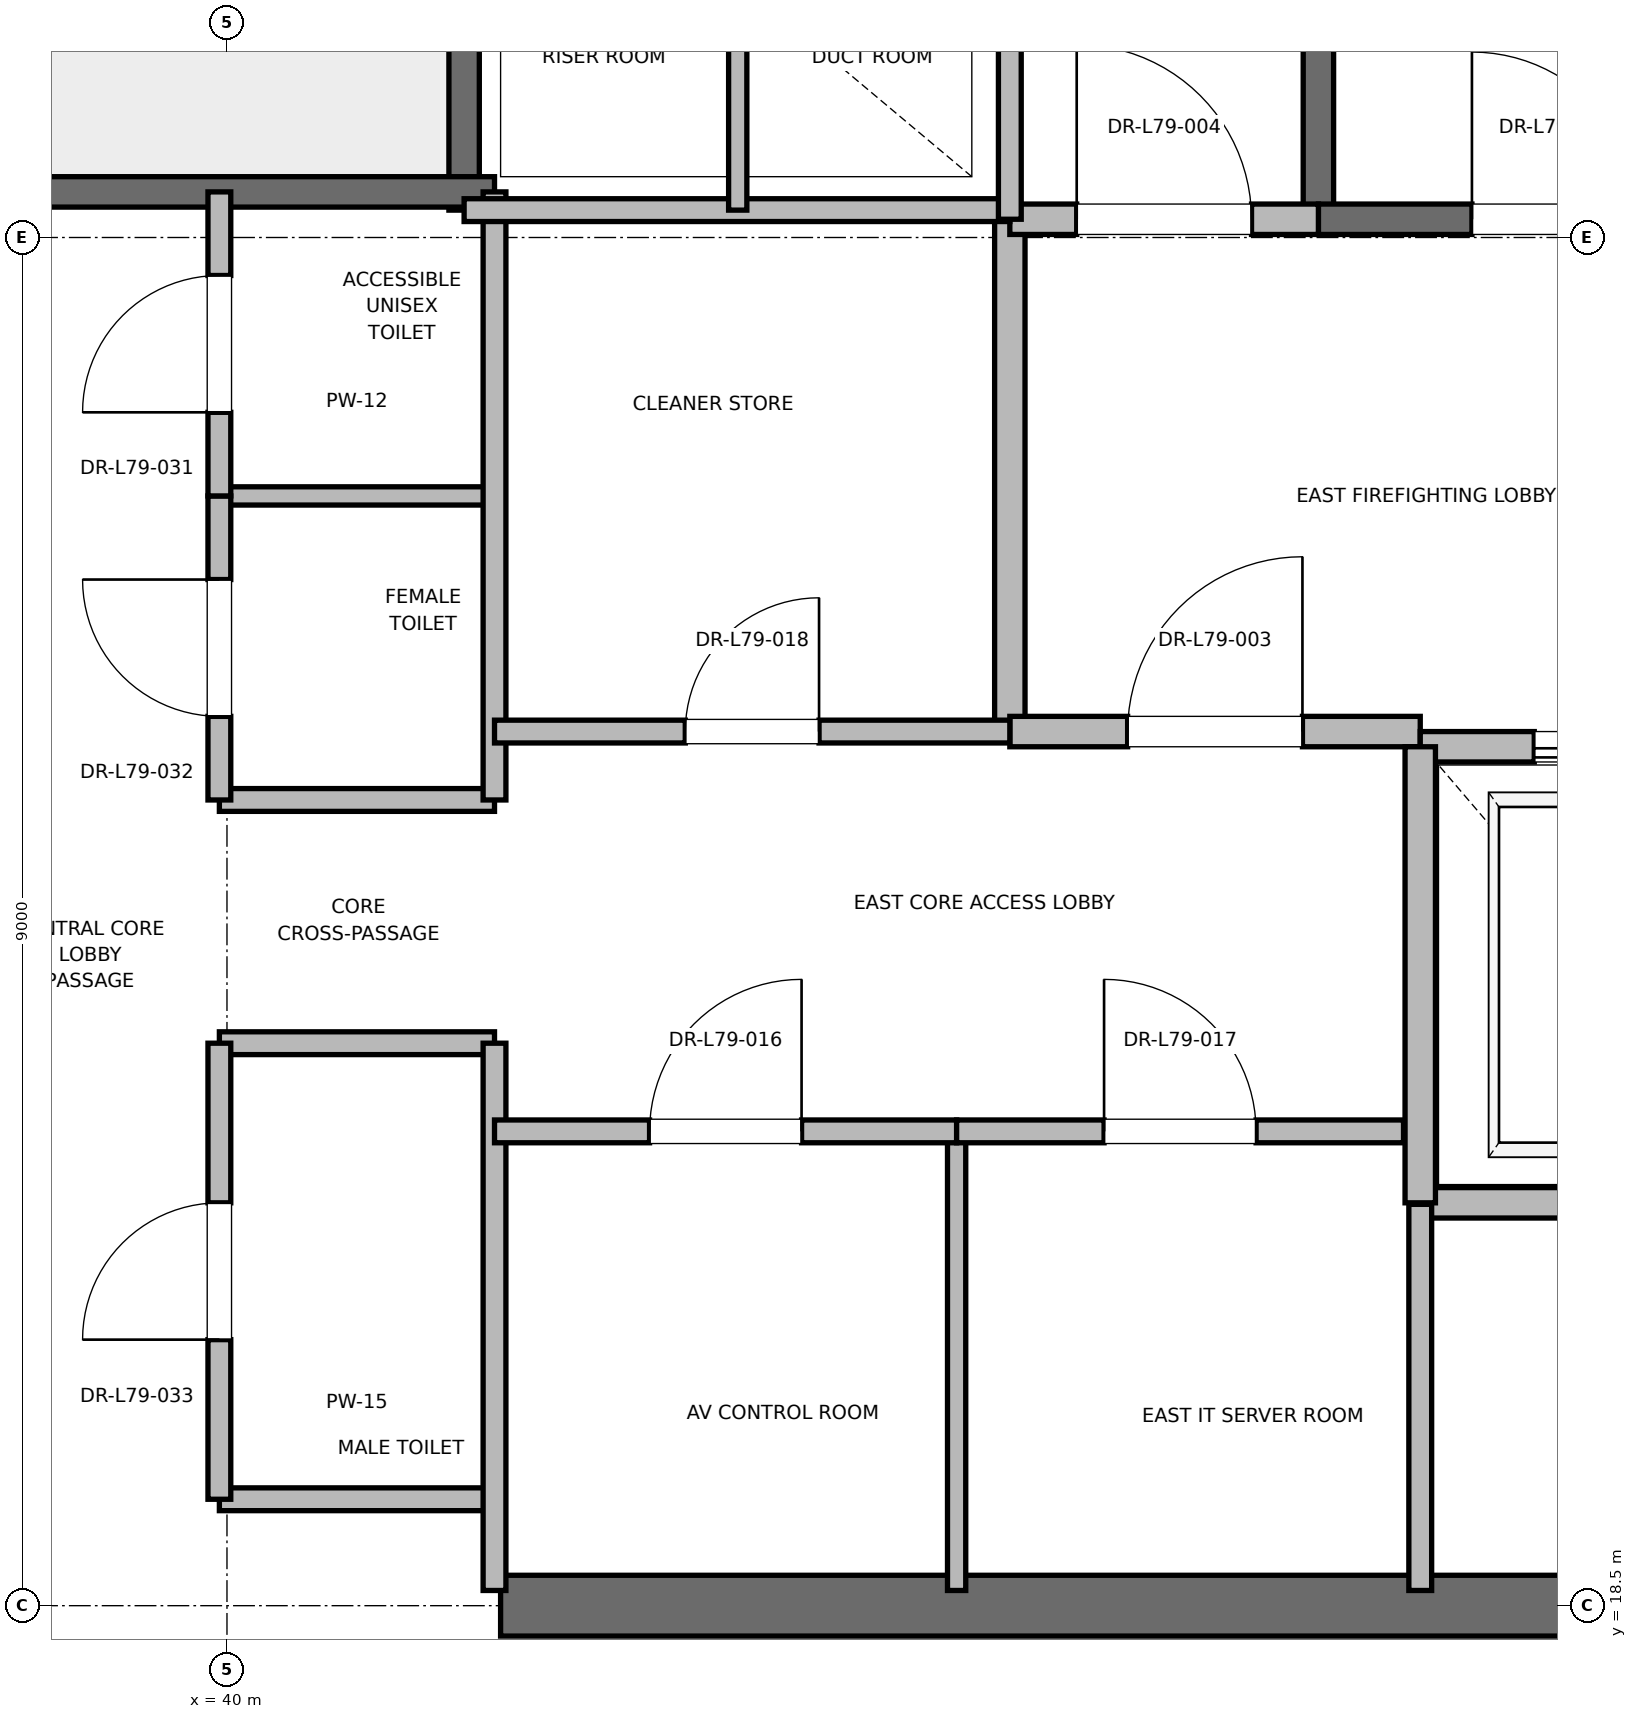
"""IFC4 building model, lengths in metres.
Left out: names, types, materials, properties, quantities, classifications, styles, units other than length and angle.
Written with IfcOpenShell. Run it as: python <this file> out.ifc"""

import sys

from ifc_helpers import new_model, si_unit, direction, frame, frame_2d, origin, place, context, subcontext, project, spatial, rectangle, extrude, element, fill, save


model = new_model("IFC4")
c1 = context("Model", 3, precision=1e-05, world=origin(), true_north=direction((0.0, 1.0)))
c2 = subcontext(c1, "Body", "Model", "MODEL_VIEW")
j1 = project(units=[si_unit("LENGTHUNIT", "METRE"), si_unit("PLANEANGLEUNIT", "RADIAN")], contexts=[c1])
p1 = place(None, origin())
s1 = spatial("IfcSite", under=j1, at=p1, CompositionType="ELEMENT")
p2 = place(p1, origin())
s2 = spatial("IfcBuilding", under=s1, at=p2, CompositionType="ELEMENT")
p3 = place(p2, frame((0.0, 0.0, 338.8)))
s3 = spatial("IfcBuildingStorey", under=s2, at=p3, CompositionType="ELEMENT", Elevation=338.8)
p4 = place(p3, frame((41.8, 18.5, 0.0), z_axis=(0.0, 0.0, 1.0), x_axis=(1.0, 0.0, 0.0)))
e1 = element("IfcWall", 1, at=p4, inside=s3, PredefinedType="SHEAR", context=c2, shape_type="SweptSolid", body=[
    extrude(rectangle(XDim=9.2, YDim=0.4, at=frame_2d((4.6, 0.0))), origin(), (0.0, 0.0, 1.0), 3.7),
])
p5 = place(p3, frame((47.18, 27.62, 0.0), z_axis=(0.0, 0.0, 1.0), x_axis=(0.0, 1.0, 0.0)))
e2 = element("IfcWall", 2, at=p5, inside=s3, PredefinedType="SOLIDWALL", context=c2, shape_type="SweptSolid", body=[
    extrude(rectangle(XDim=8.18, YDim=0.2, at=frame_2d((4.09, 0.0))), origin(), (0.0, 0.0, 1.0), 3.7),
])
p6 = place(p3, frame((47.18, 27.62, 0.0), z_axis=(0.0, 0.0, 1.0), x_axis=(1.0, 0.0, 0.0)))
e3 = element("IfcWall", 3, at=p6, inside=s3, PredefinedType="SOLIDWALL", context=c2, shape_type="SweptSolid", body=[
    extrude(rectangle(XDim=3.12, YDim=0.2, at=frame_2d((1.56, 0.0))), origin(), (0.0, 0.0, 1.0), 3.7),
])
p7 = place(p6, frame((1.01, 0.0, 0.0)))
e4 = element("IfcOpeningElement", 4, at=p7, cuts=e3, PredefinedType="OPENING", context=c2, shape_type="SweptSolid", body=[
    extrude(rectangle(XDim=1.1, YDim=2.15, at=frame_2d((0.55, 1.075))), frame((0.0, 0.1, 0.0), z_axis=(0.0, -1.0, 0.0), x_axis=(1.0, 0.0, 0.0)), (0.0, 0.0, 1.0), 0.2),
])
p8 = place(p3, frame((41.56, 27.68, 0.0), z_axis=(0.0, 0.0, 1.0), x_axis=(0.0, 1.0, 0.0)))
e5 = element("IfcWall", 5, at=p8, inside=s3, PredefinedType="SOLIDWALL", context=c2, shape_type="SweptSolid", body=[
    extrude(rectangle(XDim=8.57, YDim=0.2, at=frame_2d((4.285, 0.0))), origin(), (0.0, 0.0, 1.0), 3.7),
])
p9 = place(p3, frame((38.44, 27.8, 0.0), z_axis=(0.0, 0.0, 1.0), x_axis=(1.0, 0.0, 0.0)))
e6 = element("IfcWall", 6, at=p9, inside=s3, PredefinedType="SOLIDWALL", context=c2, shape_type="SweptSolid", body=[
    extrude(rectangle(XDim=3.32, YDim=0.2, at=frame_2d((1.66, 0.0))), origin(), (0.0, 0.0, 1.0), 3.7),
])
p10 = place(p3, frame((45.15, 24.25, 0.0), z_axis=(0.0, 0.0, 1.0), x_axis=(0.0, 1.0, 0.0)))
e7 = element("IfcWall", 7, at=p10, inside=s3, PredefinedType="PARTITIONING", context=c2, shape_type="SweptSolid", body=[
    extrude(rectangle(XDim=3.37, YDim=0.2, at=frame_2d((1.685, 0.0))), origin(), (0.0, 0.0, 1.0), 3.7),
])
p11 = place(p3, frame((45.15, 24.25, 0.0), z_axis=(0.0, 0.0, 1.0), x_axis=(1.0, 0.0, 0.0)))
e8 = element("IfcWall", 8, at=p11, inside=s3, PredefinedType="PARTITIONING", context=c2, shape_type="SweptSolid", body=[
    extrude(rectangle(XDim=2.7, YDim=0.2, at=frame_2d((1.35, 0.0))), origin(), (0.0, 0.0, 1.0), 3.7),
])
p12 = place(p11, frame((0.775, 0.0, 0.0)))
e9 = element("IfcOpeningElement", 9, at=p12, cuts=e8, PredefinedType="OPENING", context=c2, shape_type="SweptSolid", body=[
    extrude(rectangle(XDim=1.15, YDim=2.2, at=frame_2d((0.575, 1.1))), frame((0.0, 0.1, 0.0), z_axis=(0.0, -1.0, 0.0), x_axis=(1.0, 0.0, 0.0)), (0.0, 0.0, 1.0), 0.2),
])
p13 = place(p3, frame((45.15, 27.62, 0.0), z_axis=(0.0, 0.0, 1.0), x_axis=(1.0, 0.0, 0.0)))
e10 = element("IfcWall", 10, at=p13, inside=s3, PredefinedType="PARTITIONING", context=c2, shape_type="SweptSolid", body=[
    extrude(rectangle(XDim=2.03, YDim=0.2, at=frame_2d((1.015, 0.0))), origin(), (0.0, 0.0, 1.0), 3.7),
])
p14 = place(p13, frame((0.44, 0.0, 0.0)))
e11 = element("IfcOpeningElement", 11, at=p14, cuts=e10, PredefinedType="OPENING", context=c2, shape_type="SweptSolid", body=[
    extrude(rectangle(XDim=1.15, YDim=2.2, at=frame_2d((0.575, 1.1))), frame((0.0, 0.1, 0.0), z_axis=(0.0, -1.0, 0.0), x_axis=(1.0, 0.0, 0.0)), (0.0, 0.0, 1.0), 0.2),
])
p15 = place(p3, frame((47.85, 21.15, 0.0), z_axis=(0.0, 0.0, 1.0), x_axis=(1.0, 0.0, 0.0)))
e12 = element("IfcWall", 12, at=p15, inside=s3, PredefinedType="SOLIDWALL", context=c2, shape_type="SweptSolid", body=[
    extrude(rectangle(XDim=2.6, YDim=0.2, at=frame_2d((1.3, 0.0))), origin(), (0.0, 0.0, 1.0), 3.7),
])
p16 = place(p3, frame((50.45, 24.15, 0.0), z_axis=(0.0, 0.0, 1.0), x_axis=(-1.0, 0.0, 0.0)))
e13 = element("IfcWall", 13, at=p16, inside=s3, PredefinedType="SOLIDWALL", context=c2, shape_type="SweptSolid", body=[
    extrude(rectangle(XDim=2.6, YDim=0.2, at=frame_2d((1.3, 0.0))), origin(), (0.0, 0.0, 1.0), 2.78),
])
p17 = place(p16, frame((0.75, 0.0, 0.0)))
e14 = element("IfcOpeningElement", 14, at=p17, cuts=e13, PredefinedType="OPENING", context=c2, shape_type="SweptSolid", body=[
    extrude(rectangle(XDim=1.1, YDim=2.2, at=frame_2d((0.55, 1.1))), frame((0.0, 0.1, 0.0), z_axis=(0.0, -1.0, 0.0), x_axis=(1.0, 0.0, 0.0)), (0.0, 0.0, 1.0), 0.2),
])
p18 = place(p3, frame((47.85, 24.15, 0.0), z_axis=(0.0, 0.0, 1.0), x_axis=(0.0, -1.0, 0.0)))
e15 = element("IfcWall", 15, at=p18, inside=s3, PredefinedType="SOLIDWALL", context=c2, shape_type="SweptSolid", body=[
    extrude(rectangle(XDim=3.0, YDim=0.2, at=frame_2d((1.5, 0.0))), origin(), (0.0, 0.0, 1.0), 3.7),
])
for number, where, z_axis, x_axis in (
    (16, (39.95, 19.2, 0.0), (0.0, 0.0, 1.0), (1.0, 0.0, 0.0)),
    (17, (39.95, 22.2, 0.0), (0.0, 0.0, 1.0), (1.0, 0.0, 0.0)),
    (18, (39.95, 23.8, 0.0), (0.0, 0.0, 1.0), (1.0, 0.0, 0.0)),
):
    element("IfcWall", number, at=place(p3, frame(where, z_axis=z_axis, x_axis=x_axis)), inside=s3, PredefinedType="PARTITIONING", context=c2, shape_type="SweptSolid", body=[
        extrude(rectangle(XDim=1.81, YDim=0.15, at=frame_2d((0.905, 0.0))), origin(), (0.0, 0.0, 1.0), 2.85),
    ])
p19 = place(p3, frame((39.95, 25.8, 0.0), z_axis=(0.0, 0.0, 1.0), x_axis=(1.0, 0.0, 0.0)))
e19 = element("IfcWall", 19, at=p19, inside=s3, PredefinedType="PARTITIONING", context=c2, shape_type="SweptSolid", body=[
    extrude(rectangle(XDim=1.81, YDim=0.12, at=frame_2d((0.905, 0.0))), origin(), (0.0, 0.0, 1.0), 2.85),
])
p20 = place(p3, frame((41.76, 18.6, 0.0), z_axis=(0.0, 0.0, 1.0), x_axis=(0.0, 1.0, 0.0)))
e20 = element("IfcWall", 20, at=p20, inside=s3, PredefinedType="PARTITIONING", context=c2, shape_type="SweptSolid", body=[
    extrude(rectangle(XDim=3.6, YDim=0.15, at=frame_2d((1.8, 0.0))), origin(), (0.0, 0.0, 1.0), 2.78),
])
p21 = place(p3, frame((41.76, 23.8, 0.0), z_axis=(0.0, 0.0, 1.0), x_axis=(0.0, 1.0, 0.0)))
e21 = element("IfcWall", 21, at=p21, inside=s3, PredefinedType="PARTITIONING", context=c2, shape_type="SweptSolid", body=[
    extrude(rectangle(XDim=4.0, YDim=0.15, at=frame_2d((2.0, 0.0))), origin(), (0.0, 0.0, 1.0), 2.85),
])
p22 = place(p3, frame((39.95, 19.2, 0.0), z_axis=(0.0, 0.0, 1.0), x_axis=(0.0, 1.0, 0.0)))
e22 = element("IfcWall", 22, at=p22, inside=s3, PredefinedType="PARTITIONING", context=c2, shape_type="SweptSolid", body=[
    extrude(rectangle(XDim=3.0, YDim=0.15, at=frame_2d((1.5, 0.0))), origin(), (0.0, 0.0, 1.0), 2.85),
])
p23 = place(p22, frame((1.05, 0.0, 0.0)))
e23 = element("IfcOpeningElement", 23, at=p23, cuts=e22, PredefinedType="OPENING", context=c2, shape_type="SweptSolid", body=[
    extrude(rectangle(XDim=0.9, YDim=2.1, at=frame_2d((0.45, 1.05))), frame((0.0, 0.075, 0.0), z_axis=(0.0, -1.0, 0.0), x_axis=(1.0, 0.0, 0.0)), (0.0, 0.0, 1.0), 0.15),
])
p24 = place(p3, frame((39.95, 23.8, 0.0), z_axis=(0.0, 0.0, 1.0), x_axis=(0.0, 1.0, 0.0)))
e24 = element("IfcWall", 24, at=p24, inside=s3, PredefinedType="PARTITIONING", context=c2, shape_type="SweptSolid", body=[
    extrude(rectangle(XDim=2.0, YDim=0.15, at=frame_2d((1.0, 0.0))), origin(), (0.0, 0.0, 1.0), 2.85),
])
p25 = place(p24, frame((0.55, 0.0, 0.0)))
e25 = element("IfcOpeningElement", 25, at=p25, cuts=e24, PredefinedType="OPENING", context=c2, shape_type="SweptSolid", body=[
    extrude(rectangle(XDim=0.9, YDim=2.1, at=frame_2d((0.45, 1.05))), frame((0.0, 0.075, 0.0), z_axis=(0.0, -1.0, 0.0), x_axis=(1.0, 0.0, 0.0)), (0.0, 0.0, 1.0), 0.15),
])
p26 = place(p3, frame((39.95, 25.8, 0.0), z_axis=(0.0, 0.0, 1.0), x_axis=(0.0, 1.0, 0.0)))
e26 = element("IfcWall", 26, at=p26, inside=s3, PredefinedType="PARTITIONING", context=c2, shape_type="SweptSolid", body=[
    extrude(rectangle(XDim=2.0, YDim=0.15, at=frame_2d((1.0, 0.0))), origin(), (0.0, 0.0, 1.0), 2.85),
])
p27 = place(p26, frame((0.55, 0.0, 0.0)))
e27 = element("IfcOpeningElement", 27, at=p27, cuts=e26, PredefinedType="OPENING", context=c2, shape_type="SweptSolid", body=[
    extrude(rectangle(XDim=0.9, YDim=2.1, at=frame_2d((0.45, 1.05))), frame((0.0, 0.075, 0.0), z_axis=(0.0, -1.0, 0.0), x_axis=(1.0, 0.0, 0.0)), (0.0, 0.0, 1.0), 0.15),
])
p28 = place(p3, frame((41.56, 27.68, 0.0), z_axis=(0.0, 0.0, 1.0), x_axis=(1.0, 0.0, 0.0)))
e28 = element("IfcWall", 28, at=p28, inside=s3, PredefinedType="PARTITIONING", context=c2, shape_type="SweptSolid", body=[
    extrude(rectangle(XDim=3.59, YDim=0.15, at=frame_2d((1.795, 0.0))), origin(), (0.0, 0.0, 1.0), 2.85),
])
p29 = place(p3, frame((47.85, 18.6, 0.0), z_axis=(0.0, 0.0, 1.0), x_axis=(0.0, 1.0, 0.0)))
e29 = element("IfcWall", 29, at=p29, inside=s3, PredefinedType="PARTITIONING", context=c2, shape_type="SweptSolid", body=[
    extrude(rectangle(XDim=2.54, YDim=0.15, at=frame_2d((1.27, 0.0))), origin(), (0.0, 0.0, 1.0), 2.85),
])
p30 = place(p3, frame((44.8, 18.6, 0.0), z_axis=(0.0, 0.0, 1.0), x_axis=(0.0, 1.0, 0.0)))
e30 = element("IfcWall", 30, at=p30, inside=s3, PredefinedType="PARTITIONING", context=c2, shape_type="SweptSolid", body=[
    extrude(rectangle(XDim=3.02, YDim=0.12, at=frame_2d((1.51, 0.0))), origin(), (0.0, 0.0, 1.0), 2.85),
])
p31 = place(p3, frame((41.76, 21.62, 0.0), z_axis=(0.0, 0.0, 1.0), x_axis=(1.0, 0.0, 0.0)))
e31 = element("IfcWall", 31, at=p31, inside=s3, PredefinedType="PARTITIONING", context=c2, shape_type="SweptSolid", body=[
    extrude(rectangle(XDim=3.04, YDim=0.15, at=frame_2d((1.52, 0.0))), origin(), (0.0, 0.0, 1.0), 2.85),
])
p32 = place(p31, frame((1.02, 0.0, 0.0)))
e32 = element("IfcOpeningElement", 32, at=p32, cuts=e31, PredefinedType="OPENING", context=c2, shape_type="SweptSolid", body=[
    extrude(rectangle(XDim=1.0, YDim=2.15, at=frame_2d((0.5, 1.075))), frame((0.0, 0.075, 0.0), z_axis=(0.0, -1.0, 0.0), x_axis=(1.0, 0.0, 0.0)), (0.0, 0.0, 1.0), 0.15),
])
p33 = place(p3, frame((44.8, 21.62, 0.0), z_axis=(0.0, 0.0, 1.0), x_axis=(1.0, 0.0, 0.0)))
e33 = element("IfcWall", 33, at=p33, inside=s3, PredefinedType="PARTITIONING", context=c2, shape_type="SweptSolid", body=[
    extrude(rectangle(XDim=2.94, YDim=0.15, at=frame_2d((1.47, 0.0))), origin(), (0.0, 0.0, 1.0), 2.85),
])
p34 = place(p33, frame((0.97, 0.0, 0.0)))
e34 = element("IfcOpeningElement", 34, at=p34, cuts=e33, PredefinedType="OPENING", context=c2, shape_type="SweptSolid", body=[
    extrude(rectangle(XDim=1.0, YDim=2.15, at=frame_2d((0.5, 1.075))), frame((0.0, 0.075, 0.0), z_axis=(0.0, -1.0, 0.0), x_axis=(1.0, 0.0, 0.0)), (0.0, 0.0, 1.0), 0.15),
])
p35 = place(p3, frame((41.76, 24.25, 0.0), z_axis=(0.0, 0.0, 1.0), x_axis=(1.0, 0.0, 0.0)))
e35 = element("IfcWall", 35, at=p35, inside=s3, PredefinedType="PARTITIONING", context=c2, shape_type="SweptSolid", body=[
    extrude(rectangle(XDim=3.39, YDim=0.15, at=frame_2d((1.695, 0.0))), origin(), (0.0, 0.0, 1.0), 2.85),
])
p36 = place(p35, frame((1.255, 0.0, 0.0)))
e36 = element("IfcOpeningElement", 36, at=p36, cuts=e35, PredefinedType="OPENING", context=c2, shape_type="SweptSolid", body=[
    extrude(rectangle(XDim=0.88, YDim=2.1, at=frame_2d((0.44, 1.05))), frame((0.0, 0.075, 0.0), z_axis=(0.0, -1.0, 0.0), x_axis=(1.0, 0.0, 0.0)), (0.0, 0.0, 1.0), 0.15),
])
p37 = place(p3, frame((45.15, 27.62, 0.0), z_axis=(0.0, 0.0, 1.0), x_axis=(0.0, 1.0, 0.0)))
e37 = element("IfcWall", 37, at=p37, inside=s3, PredefinedType="PARTITIONING", context=c2, shape_type="SweptSolid", body=[
    extrude(rectangle(XDim=3.1, YDim=0.15, at=frame_2d((1.55, 0.0))), origin(), (0.0, 0.0, 1.0), 2.85),
])
p38 = place(p3, frame((43.36, 27.68, 0.0), z_axis=(0.0, 0.0, 1.0), x_axis=(0.0, 1.0, 0.0)))
e38 = element("IfcWall", 38, at=p38, inside=s3, PredefinedType="PARTITIONING", context=c2, shape_type="SweptSolid", body=[
    extrude(rectangle(XDim=3.04, YDim=0.12, at=frame_2d((1.52, 0.0))), origin(), (0.0, 0.0, 1.0), 2.85),
])
p39 = place(p7, origin())
e39 = element("IfcDoor", 39, at=p39, inside=s3, OperationType="SINGLE_SWING_LEFT", PredefinedType="DOOR", context=c2, shape_type="SweptSolid", body=[
    extrude(rectangle(XDim=1.1, YDim=2.15, at=frame_2d((0.55, 1.075))), frame((0.0, 0.025, 0.0), z_axis=(0.0, -1.0, 0.0), x_axis=(1.0, 0.0, 0.0)), (0.0, 0.0, 1.0), 0.05),
])
fill(e4, e39)
p40 = place(p12, origin())
e40 = element("IfcDoor", 40, at=p40, inside=s3, OperationType="SINGLE_SWING_RIGHT", PredefinedType="DOOR", context=c2, shape_type="SweptSolid", body=[
    extrude(rectangle(XDim=1.15, YDim=2.2, at=frame_2d((0.575, 1.1))), frame((0.0, 0.025, 0.0), z_axis=(0.0, -1.0, 0.0), x_axis=(1.0, 0.0, 0.0)), (0.0, 0.0, 1.0), 0.05),
])
fill(e9, e40)
p41 = place(p14, origin())
e41 = element("IfcDoor", 41, at=p41, inside=s3, OperationType="SINGLE_SWING_LEFT", PredefinedType="DOOR", context=c2, shape_type="SweptSolid", body=[
    extrude(rectangle(XDim=1.15, YDim=2.2, at=frame_2d((0.575, 1.1))), frame((0.0, 0.025, 0.0), z_axis=(0.0, -1.0, 0.0), x_axis=(1.0, 0.0, 0.0)), (0.0, 0.0, 1.0), 0.05),
])
fill(e11, e41)
p42 = place(p17, origin())
e42 = element("IfcDoor", 42, at=p42, inside=s3, OperationType="SLIDING_TO_RIGHT", PredefinedType="DOOR", context=c2, shape_type="SweptSolid", body=[
    extrude(rectangle(XDim=1.1, YDim=2.2, at=frame_2d((0.55, 1.1))), frame((0.0, 0.025, 0.0), z_axis=(0.0, -1.0, 0.0), x_axis=(1.0, 0.0, 0.0)), (0.0, 0.0, 1.0), 0.05),
])
fill(e14, e42)
p43 = place(p23, origin())
e43 = element("IfcDoor", 43, at=p43, inside=s3, OperationType="SINGLE_SWING_LEFT", PredefinedType="DOOR", context=c2, shape_type="SweptSolid", body=[
    extrude(rectangle(XDim=0.9, YDim=2.1, at=frame_2d((0.45, 1.05))), frame((0.0, 0.025, 0.0), z_axis=(0.0, -1.0, 0.0), x_axis=(1.0, 0.0, 0.0)), (0.0, 0.0, 1.0), 0.05),
])
fill(e23, e43)
p44 = place(p25, origin())
e44 = element("IfcDoor", 44, at=p44, inside=s3, OperationType="SINGLE_SWING_RIGHT", PredefinedType="DOOR", context=c2, shape_type="SweptSolid", body=[
    extrude(rectangle(XDim=0.9, YDim=2.1, at=frame_2d((0.45, 1.05))), frame((0.0, 0.025, 0.0), z_axis=(0.0, -1.0, 0.0), x_axis=(1.0, 0.0, 0.0)), (0.0, 0.0, 1.0), 0.05),
])
fill(e25, e44)
p45 = place(p27, origin())
e45 = element("IfcDoor", 45, at=p45, inside=s3, OperationType="SINGLE_SWING_LEFT", PredefinedType="DOOR", context=c2, shape_type="SweptSolid", body=[
    extrude(rectangle(XDim=0.9, YDim=2.1, at=frame_2d((0.45, 1.05))), frame((0.0, 0.025, 0.0), z_axis=(0.0, -1.0, 0.0), x_axis=(1.0, 0.0, 0.0)), (0.0, 0.0, 1.0), 0.05),
])
fill(e27, e45)
p46 = place(p32, origin())
e46 = element("IfcDoor", 46, at=p46, inside=s3, OperationType="SINGLE_SWING_RIGHT", PredefinedType="DOOR", context=c2, shape_type="SweptSolid", body=[
    extrude(rectangle(XDim=1.0, YDim=2.15, at=frame_2d((0.5, 1.075))), frame((0.0, 0.025, 0.0), z_axis=(0.0, -1.0, 0.0), x_axis=(1.0, 0.0, 0.0)), (0.0, 0.0, 1.0), 0.05),
])
fill(e32, e46)
p47 = place(p34, origin())
e47 = element("IfcDoor", 47, at=p47, inside=s3, OperationType="SINGLE_SWING_LEFT", PredefinedType="DOOR", context=c2, shape_type="SweptSolid", body=[
    extrude(rectangle(XDim=1.0, YDim=2.15, at=frame_2d((0.5, 1.075))), frame((0.0, 0.025, 0.0), z_axis=(0.0, -1.0, 0.0), x_axis=(1.0, 0.0, 0.0)), (0.0, 0.0, 1.0), 0.05),
])
fill(e34, e47)
p48 = place(p36, origin())
e48 = element("IfcDoor", 48, at=p48, inside=s3, OperationType="SINGLE_SWING_RIGHT", PredefinedType="DOOR", context=c2, shape_type="SweptSolid", body=[
    extrude(rectangle(XDim=0.88, YDim=2.1, at=frame_2d((0.44, 1.05))), frame((0.0, 0.025, 0.0), z_axis=(0.0, -1.0, 0.0), x_axis=(1.0, 0.0, 0.0)), (0.0, 0.0, 1.0), 0.05),
])
fill(e36, e48)
save(model, sys.argv[1])
